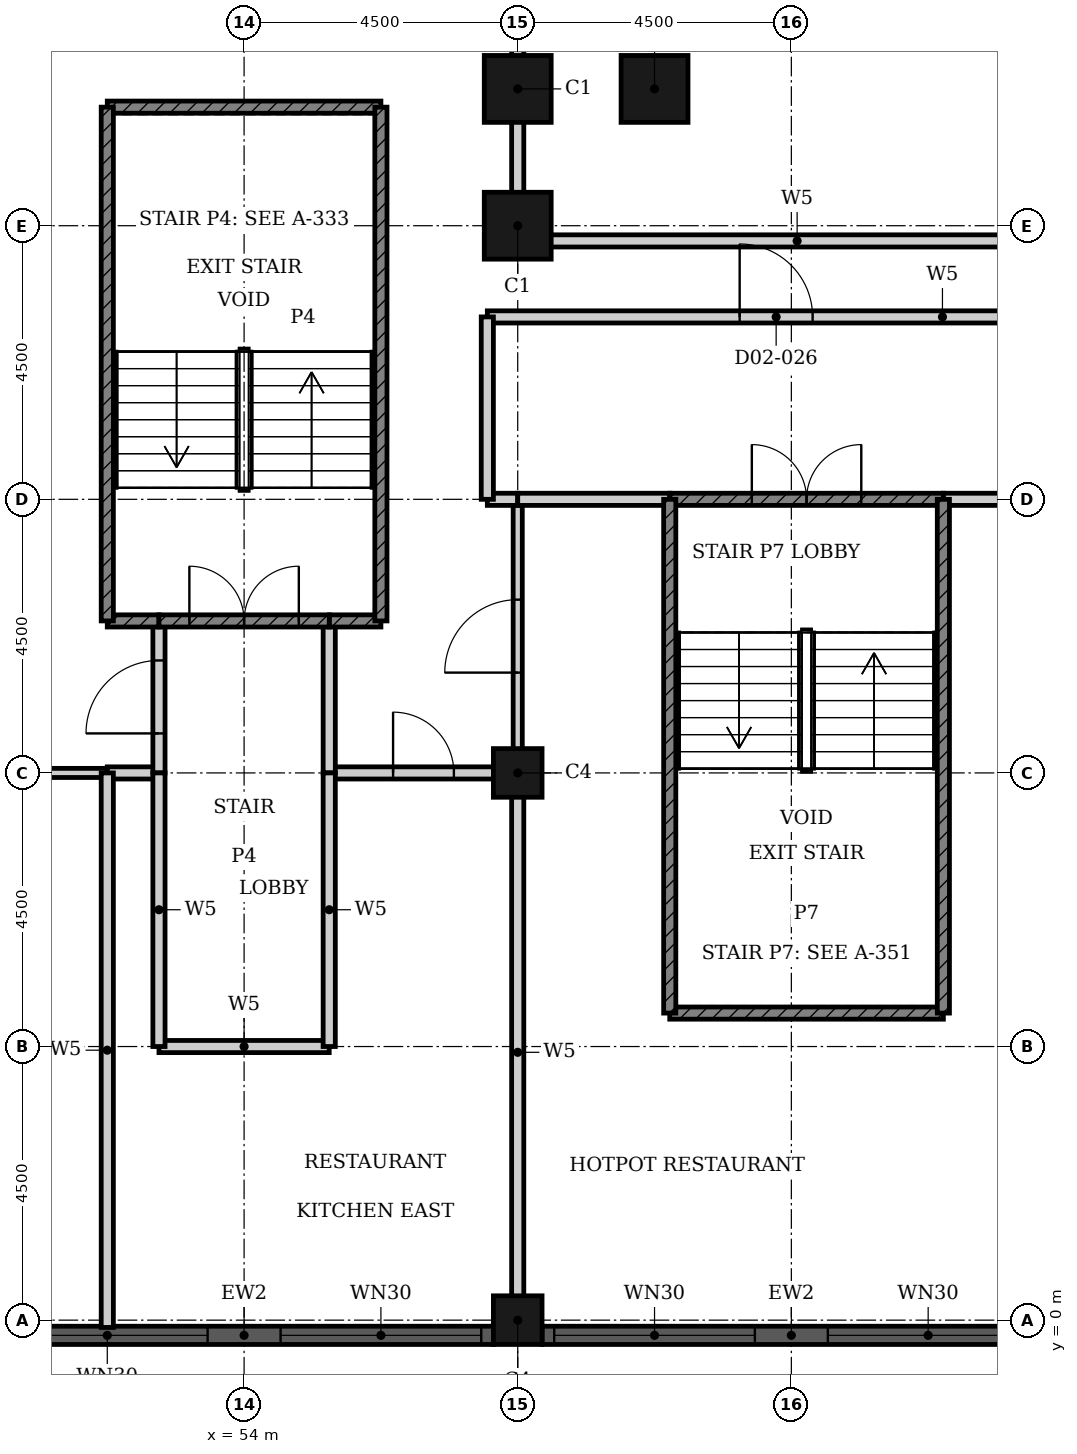
"""IFC4 building model, lengths in metres.
Left out: names, types, materials, properties, quantities, classifications, styles, units other than length and angle.
Written with IfcOpenShell. Run it as: python <this file> out.ifc"""

import sys

from ifc_helpers import new_model, si_unit, direction, frame, frame_2d, origin, origin_2d, place, context, subcontext, project, spatial, rectangle, hollow_rectangle, extrude, element, fill, save


model = new_model("IFC4")
c1 = context("Model", 3, precision=1e-05, world=origin(), true_north=direction((0.0, 1.0)))
c2 = subcontext(c1, "Body", "Model", "MODEL_VIEW")
j1 = project(units=[si_unit("LENGTHUNIT", "METRE"), si_unit("PLANEANGLEUNIT", "RADIAN")], contexts=[c1])
p1 = place(None, origin())
s1 = spatial("IfcSite", under=j1, at=p1, CompositionType="ELEMENT")
p2 = place(p1, origin())
s2 = spatial("IfcBuilding", under=s1, at=p2, CompositionType="ELEMENT")
p3 = place(p2, frame((0.0, 0.0, 12.0)))
s3 = spatial("IfcBuildingStorey", under=s2, at=p3, CompositionType="ELEMENT", Elevation=12.0)
for number, where, z_axis, x_axis in (
    (1, (58.5, 18.0, 0.0), (0.0, 0.0, 1.0), (1.0, 0.0, 0.0)),
    (2, (58.5, 20.25, 0.0), (0.0, 0.0, 1.0), (1.0, 0.0, 0.0)),
    (3, (60.75, 20.25, 0.0), (0.0, 0.0, 1.0), (1.0, 0.0, 0.0)),
):
    element("IfcColumn", number, at=place(p3, frame(where, z_axis=z_axis, x_axis=x_axis)), inside=s3, PredefinedType="COLUMN", context=c2, shape_type="SweptSolid", body=[
        extrude(hollow_rectangle(XDim=1.1, YDim=1.1, WallThickness=0.036, at=origin_2d()), origin(), (0.0, 0.0, 1.0), 5.4),
    ])
for number, where, z_axis, x_axis in (
    (4, (58.5, 0.0, 0.0), (0.0, 0.0, 1.0), (1.0, 0.0, 0.0)),
    (5, (58.5, 9.0, 0.0), (0.0, 0.0, 1.0), (1.0, 0.0, 0.0)),
):
    element("IfcColumn", number, at=place(p3, frame(where, z_axis=z_axis, x_axis=x_axis)), inside=s3, PredefinedType="COLUMN", context=c2, shape_type="SweptSolid", body=[
        extrude(hollow_rectangle(XDim=0.8, YDim=0.8, WallThickness=0.025, at=origin_2d()), origin(), (0.0, 0.0, 1.0), 5.4),
    ])
p4 = place(p3, frame((49.9, -0.25, 0.0), z_axis=(0.0, 0.0, 1.0), x_axis=(1.0, 0.0, 0.0)))
e6 = element("IfcWall", 6, at=p4, inside=s3, PredefinedType="SOLIDWALL", context=c2, shape_type="SweptSolid", body=[
    extrude(rectangle(XDim=8.2, YDim=0.3, at=frame_2d((4.1, 0.0))), origin(), (0.0, 0.0, 1.0), 5.4),
])
p5 = place(p4, frame((0.2, 0.0, 0.9)))
e7 = element("IfcOpeningElement", 7, at=p5, cuts=e6, PredefinedType="OPENING", context=c2, shape_type="SweptSolid", body=[
    extrude(rectangle(XDim=3.3, YDim=3.5, at=frame_2d((1.65, 1.75))), frame((0.0, 0.16, 0.0), z_axis=(0.0, -1.0, 0.0), x_axis=(1.0, 0.0, 0.0)), (0.0, 0.0, 1.0), 0.32),
])
p6 = place(p4, frame((4.7, 0.0, 0.9)))
e8 = element("IfcOpeningElement", 8, at=p6, cuts=e6, PredefinedType="OPENING", context=c2, shape_type="SweptSolid", body=[
    extrude(rectangle(XDim=3.3, YDim=3.5, at=frame_2d((1.65, 1.75))), frame((0.0, 0.16, 0.0), z_axis=(0.0, -1.0, 0.0), x_axis=(1.0, 0.0, 0.0)), (0.0, 0.0, 1.0), 0.32),
])
p7 = place(p3, frame((58.9, -0.25, 0.0), z_axis=(0.0, 0.0, 1.0), x_axis=(1.0, 0.0, 0.0)))
e9 = element("IfcWall", 9, at=p7, inside=s3, PredefinedType="SOLIDWALL", context=c2, shape_type="SweptSolid", body=[
    extrude(rectangle(XDim=8.2, YDim=0.3, at=frame_2d((4.1, 0.0))), origin(), (0.0, 0.0, 1.0), 5.4),
])
p8 = place(p7, frame((0.2, 0.0, 0.9)))
e10 = element("IfcOpeningElement", 10, at=p8, cuts=e9, PredefinedType="OPENING", context=c2, shape_type="SweptSolid", body=[
    extrude(rectangle(XDim=3.3, YDim=3.5, at=frame_2d((1.65, 1.75))), frame((0.0, 0.16, 0.0), z_axis=(0.0, -1.0, 0.0), x_axis=(1.0, 0.0, 0.0)), (0.0, 0.0, 1.0), 0.32),
])
p9 = place(p7, frame((4.7, 0.0, 0.9)))
e11 = element("IfcOpeningElement", 11, at=p9, cuts=e9, PredefinedType="OPENING", context=c2, shape_type="SweptSolid", body=[
    extrude(rectangle(XDim=3.3, YDim=3.5, at=frame_2d((1.65, 1.75))), frame((0.0, 0.16, 0.0), z_axis=(0.0, -1.0, 0.0), x_axis=(1.0, 0.0, 0.0)), (0.0, 0.0, 1.0), 0.32),
])
p10 = place(p3, frame((41.75, 9.0, 0.0), z_axis=(0.0, 0.0, 1.0), x_axis=(1.0, 0.0, 0.0)))
e12 = element("IfcWall", 12, at=p10, inside=s3, PredefinedType="PARTITIONING", context=c2, shape_type="SweptSolid", body=[
    extrude(rectangle(XDim=10.0, YDim=0.15, at=frame_2d((5.0, 0.0))), origin(), (0.0, 0.0, 1.0), 5.05),
])
p11 = place(p10, frame((4.4, 0.0, 0.0)))
e13 = element("IfcOpeningElement", 13, at=p11, cuts=e12, PredefinedType="OPENING", context=c2, shape_type="SweptSolid", body=[
    extrude(rectangle(XDim=1.2, YDim=2.4, at=frame_2d((0.6, 1.2))), frame((0.0, 0.085, 0.0), z_axis=(0.0, -1.0, 0.0), x_axis=(1.0, 0.0, 0.0)), (0.0, 0.0, 1.0), 0.17),
])
p12 = place(p3, frame((58.5, 9.0, 0.0), z_axis=(0.0, 0.0, 1.0), x_axis=(0.0, 1.0, 0.0)))
e14 = element("IfcWall", 14, at=p12, inside=s3, PredefinedType="PARTITIONING", context=c2, shape_type="SweptSolid", body=[
    extrude(rectangle(XDim=4.5, YDim=0.15, at=frame_2d((2.25, 0.0))), origin(), (0.0, 0.0, 1.0), 5.05),
])
p13 = place(p12, frame((1.65, 0.0, 0.0)))
e15 = element("IfcOpeningElement", 15, at=p13, cuts=e14, PredefinedType="OPENING", context=c2, shape_type="SweptSolid", body=[
    extrude(rectangle(XDim=1.2, YDim=2.4, at=frame_2d((0.6, 1.2))), frame((0.0, 0.085, 0.0), z_axis=(0.0, -1.0, 0.0), x_axis=(1.0, 0.0, 0.0)), (0.0, 0.0, 1.0), 0.17),
])
p14 = place(p3, frame((58.0, 13.5, 0.0), z_axis=(0.0, 0.0, 1.0), x_axis=(1.0, 0.0, 0.0)))
e16 = element("IfcWall", 16, at=p14, inside=s3, PredefinedType="PARTITIONING", context=c2, shape_type="SweptSolid", body=[
    extrude(rectangle(XDim=0.5, YDim=0.2, at=frame_2d((0.25, 0.0))), origin(), (0.0, 0.0, 1.0), 5.05),
])
p15 = place(p3, frame((58.5, 13.5, 0.0), z_axis=(0.0, 0.0, 1.0), x_axis=(1.0, 0.0, 0.0)))
e17 = element("IfcWall", 17, at=p15, inside=s3, PredefinedType="PARTITIONING", context=c2, shape_type="SweptSolid", body=[
    extrude(rectangle(XDim=2.5, YDim=0.2, at=frame_2d((1.25, 0.0))), origin(), (0.0, 0.0, 1.0), 5.05),
])
p16 = place(p3, frame((65.5, 13.5, 0.0), z_axis=(0.0, 0.0, 1.0), x_axis=(1.0, 0.0, 0.0)))
e18 = element("IfcWall", 18, at=p16, inside=s3, PredefinedType="PARTITIONING", context=c2, shape_type="SweptSolid", body=[
    extrude(rectangle(XDim=2.29, YDim=0.2, at=frame_2d((1.145, 0.0))), origin(), (0.0, 0.0, 1.0), 5.05),
])
p17 = place(p3, frame((58.0, 16.5, 0.0), z_axis=(0.0, 0.0, 1.0), x_axis=(1.0, 0.0, 0.0)))
e19 = element("IfcWall", 19, at=p17, inside=s3, PredefinedType="PARTITIONING", context=c2, shape_type="SweptSolid", body=[
    extrude(rectangle(XDim=9.62, YDim=0.2, at=frame_2d((4.81, 0.0))), origin(), (0.0, 0.0, 1.0), 5.05),
])
p18 = place(p17, frame((4.15, 0.0, 0.0)))
e20 = element("IfcOpeningElement", 20, at=p18, cuts=e19, PredefinedType="OPENING", context=c2, shape_type="SweptSolid", body=[
    extrude(rectangle(XDim=1.2, YDim=2.1, at=frame_2d((0.6, 1.05))), frame((0.0, 0.11, 0.0), z_axis=(0.0, -1.0, 0.0), x_axis=(1.0, 0.0, 0.0)), (0.0, 0.0, 1.0), 0.22),
])
p19 = place(p3, frame((58.5, 17.75, 0.0), z_axis=(0.0, 0.0, 1.0), x_axis=(1.0, 0.0, 0.0)))
e21 = element("IfcWall", 21, at=p19, inside=s3, PredefinedType="PARTITIONING", context=c2, shape_type="SweptSolid", body=[
    extrude(rectangle(XDim=9.19, YDim=0.2, at=frame_2d((4.595, 0.0))), origin(), (0.0, 0.0, 1.0), 5.05),
])
p20 = place(p3, frame((52.6, 4.5, 0.0), z_axis=(0.0, 0.0, 1.0), x_axis=(1.0, 0.0, 0.0)))
e22 = element("IfcWall", 22, at=p20, inside=s3, PredefinedType="PARTITIONING", context=c2, shape_type="SweptSolid", body=[
    extrude(rectangle(XDim=2.8, YDim=0.2, at=frame_2d((1.4, 0.0))), origin(), (0.0, 0.0, 1.0), 5.05),
])
p21 = place(p3, frame((51.75, 9.0, 0.0), z_axis=(0.0, 0.0, 1.0), x_axis=(1.0, 0.0, 0.0)))
e23 = element("IfcWall", 23, at=p21, inside=s3, PredefinedType="PARTITIONING", context=c2, shape_type="SweptSolid", body=[
    extrude(rectangle(XDim=0.85, YDim=0.2, at=frame_2d((0.425, 0.0))), origin(), (0.0, 0.0, 1.0), 5.05),
])
p22 = place(p3, frame((55.4, 9.0, 0.0), z_axis=(0.0, 0.0, 1.0), x_axis=(1.0, 0.0, 0.0)))
e24 = element("IfcWall", 24, at=p22, inside=s3, PredefinedType="PARTITIONING", context=c2, shape_type="SweptSolid", body=[
    extrude(rectangle(XDim=3.1, YDim=0.2, at=frame_2d((1.55, 0.0))), origin(), (0.0, 0.0, 1.0), 5.05),
])
p23 = place(p22, frame((1.05, 0.0, 0.0)))
e25 = element("IfcOpeningElement", 25, at=p23, cuts=e24, PredefinedType="OPENING", context=c2, shape_type="SweptSolid", body=[
    extrude(rectangle(XDim=1.0, YDim=2.1, at=frame_2d((0.5, 1.05))), frame((0.0, 0.11, 0.0), z_axis=(0.0, -1.0, 0.0), x_axis=(1.0, 0.0, 0.0)), (0.0, 0.0, 1.0), 0.22),
])
p24 = place(p3, frame((51.75, -0.12, 0.0), z_axis=(0.0, 0.0, 1.0), x_axis=(0.0, 1.0, 0.0)))
e26 = element("IfcWall", 26, at=p24, inside=s3, PredefinedType="PARTITIONING", context=c2, shape_type="SweptSolid", body=[
    extrude(rectangle(XDim=9.12, YDim=0.2, at=frame_2d((4.56, 0.0))), origin(), (0.0, 0.0, 1.0), 5.05),
])
p25 = place(p3, frame((52.6, 9.0, 0.0), z_axis=(0.0, 0.0, 1.0), x_axis=(0.0, 1.0, 0.0)))
e27 = element("IfcWall", 27, at=p25, inside=s3, PredefinedType="PARTITIONING", context=c2, shape_type="SweptSolid", body=[
    extrude(rectangle(XDim=2.5, YDim=0.2, at=frame_2d((1.25, 0.0))), origin(), (0.0, 0.0, 1.0), 5.05),
])
p26 = place(p25, frame((0.65, 0.0, 0.0)))
e28 = element("IfcOpeningElement", 28, at=p26, cuts=e27, PredefinedType="OPENING", context=c2, shape_type="SweptSolid", body=[
    extrude(rectangle(XDim=1.2, YDim=2.1, at=frame_2d((0.6, 1.05))), frame((0.0, 0.11, 0.0), z_axis=(0.0, -1.0, 0.0), x_axis=(1.0, 0.0, 0.0)), (0.0, 0.0, 1.0), 0.22),
])
p27 = place(p3, frame((52.6, 4.5, 0.0), z_axis=(0.0, 0.0, 1.0), x_axis=(0.0, 1.0, 0.0)))
e29 = element("IfcWall", 29, at=p27, inside=s3, PredefinedType="PARTITIONING", context=c2, shape_type="SweptSolid", body=[
    extrude(rectangle(XDim=4.5, YDim=0.2, at=frame_2d((2.25, 0.0))), origin(), (0.0, 0.0, 1.0), 5.05),
])
p28 = place(p3, frame((55.4, 9.0, 0.0), z_axis=(0.0, 0.0, 1.0), x_axis=(0.0, 1.0, 0.0)))
e30 = element("IfcWall", 30, at=p28, inside=s3, PredefinedType="PARTITIONING", context=c2, shape_type="SweptSolid", body=[
    extrude(rectangle(XDim=2.5, YDim=0.2, at=frame_2d((1.25, 0.0))), origin(), (0.0, 0.0, 1.0), 5.05),
])
p29 = place(p3, frame((55.4, 4.5, 0.0), z_axis=(0.0, 0.0, 1.0), x_axis=(0.0, 1.0, 0.0)))
e31 = element("IfcWall", 31, at=p29, inside=s3, PredefinedType="PARTITIONING", context=c2, shape_type="SweptSolid", body=[
    extrude(rectangle(XDim=4.5, YDim=0.2, at=frame_2d((2.25, 0.0))), origin(), (0.0, 0.0, 1.0), 5.05),
])
p30 = place(p3, frame((58.0, 13.5, 0.0), z_axis=(0.0, 0.0, 1.0), x_axis=(0.0, 1.0, 0.0)))
e32 = element("IfcWall", 32, at=p30, inside=s3, PredefinedType="PARTITIONING", context=c2, shape_type="SweptSolid", body=[
    extrude(rectangle(XDim=3.0, YDim=0.2, at=frame_2d((1.5, 0.0))), origin(), (0.0, 0.0, 1.0), 5.05),
])
p31 = place(p3, frame((58.5, -0.19, 0.0), z_axis=(0.0, 0.0, 1.0), x_axis=(0.0, 1.0, 0.0)))
e33 = element("IfcWall", 33, at=p31, inside=s3, PredefinedType="PARTITIONING", context=c2, shape_type="SweptSolid", body=[
    extrude(rectangle(XDim=9.19, YDim=0.2, at=frame_2d((4.595, 0.0))), origin(), (0.0, 0.0, 1.0), 5.05),
])
p32 = place(p3, frame((58.5, 17.75, 0.0), z_axis=(0.0, 0.0, 1.0), x_axis=(0.0, 1.0, 0.0)))
e34 = element("IfcWall", 34, at=p32, inside=s3, PredefinedType="PARTITIONING", context=c2, shape_type="SweptSolid", body=[
    extrude(rectangle(XDim=11.75, YDim=0.2, at=frame_2d((5.875, 0.0))), origin(), (0.0, 0.0, 1.0), 5.05),
])
p33 = place(p32, frame((5.375, 0.0, 0.0)))
e35 = element("IfcOpeningElement", 35, at=p33, cuts=e34, PredefinedType="OPENING", context=c2, shape_type="SweptSolid", body=[
    extrude(rectangle(XDim=1.0, YDim=2.1, at=frame_2d((0.5, 1.05))), frame((0.0, 0.11, 0.0), z_axis=(0.0, -1.0, 0.0), x_axis=(1.0, 0.0, 0.0)), (0.0, 0.0, 1.0), 0.22),
])
for number, where, z_axis, x_axis in (
    (36, (51.75, 11.5, 0.0), (0.0, 0.0, 1.0), (1.0, 0.0, 0.0)),
    (37, (55.4, 11.5, 0.0), (0.0, 0.0, 1.0), (1.0, 0.0, 0.0)),
):
    element("IfcWall", number, at=place(p3, frame(where, z_axis=z_axis, x_axis=x_axis)), inside=s3, PredefinedType="SHEAR", context=c2, shape_type="SweptSolid", body=[
        extrude(rectangle(XDim=0.85, YDim=0.2, at=frame_2d((0.425, 0.0))), origin(), (0.0, 0.0, 1.0), 5.05),
    ])
p34 = place(p3, frame((52.6, 11.5, 0.0), z_axis=(0.0, 0.0, 1.0), x_axis=(1.0, 0.0, 0.0)))
e38 = element("IfcWall", 38, at=p34, inside=s3, PredefinedType="SHEAR", context=c2, shape_type="SweptSolid", body=[
    extrude(rectangle(XDim=2.8, YDim=0.2, at=frame_2d((1.4, 0.0))), origin(), (0.0, 0.0, 1.0), 5.05),
])
p35 = place(p34, frame((0.5, 0.0, 0.0)))
e39 = element("IfcOpeningElement", 39, at=p35, cuts=e38, PredefinedType="OPENING", context=c2, shape_type="SweptSolid", body=[
    extrude(rectangle(XDim=1.8, YDim=2.1, at=frame_2d((0.9, 1.05))), frame((0.0, 0.11, 0.0), z_axis=(0.0, -1.0, 0.0), x_axis=(1.0, 0.0, 0.0)), (0.0, 0.0, 1.0), 0.22),
])
p36 = place(p3, frame((61.0, 13.5, 0.0), z_axis=(0.0, 0.0, 1.0), x_axis=(1.0, 0.0, 0.0)))
e40 = element("IfcWall", 40, at=p36, inside=s3, PredefinedType="SHEAR", context=c2, shape_type="SweptSolid", body=[
    extrude(rectangle(XDim=4.5, YDim=0.2, at=frame_2d((2.25, 0.0))), origin(), (0.0, 0.0, 1.0), 5.05),
])
p37 = place(p36, frame((1.35, 0.0, 0.0)))
e41 = element("IfcOpeningElement", 41, at=p37, cuts=e40, PredefinedType="OPENING", context=c2, shape_type="SweptSolid", body=[
    extrude(rectangle(XDim=1.8, YDim=2.1, at=frame_2d((0.9, 1.05))), frame((0.0, 0.11, 0.0), z_axis=(0.0, -1.0, 0.0), x_axis=(1.0, 0.0, 0.0)), (0.0, 0.0, 1.0), 0.22),
])
for number, where, z_axis, x_axis in (
    (42, (51.75, 19.95, 0.0), (0.0, 0.0, 1.0), (1.0, 0.0, 0.0)),
    (43, (61.0, 5.05, 0.0), (0.0, 0.0, 1.0), (1.0, 0.0, 0.0)),
):
    element("IfcWall", number, at=place(p3, frame(where, z_axis=z_axis, x_axis=x_axis)), inside=s3, PredefinedType="SHEAR", context=c2, shape_type="SweptSolid", body=[
        extrude(rectangle(XDim=4.5, YDim=0.2, at=frame_2d((2.25, 0.0))), origin(), (0.0, 0.0, 1.0), 5.05),
    ])
for number, where, z_axis, x_axis in (
    (44, (51.75, 11.5, 0.0), (0.0, 0.0, 1.0), (0.0, 1.0, 0.0)),
    (45, (56.25, 11.5, 0.0), (0.0, 0.0, 1.0), (0.0, 1.0, 0.0)),
    (46, (61.0, 5.05, 0.0), (0.0, 0.0, 1.0), (0.0, 1.0, 0.0)),
    (47, (65.5, 5.05, 0.0), (0.0, 0.0, 1.0), (0.0, 1.0, 0.0)),
):
    element("IfcWall", number, at=place(p3, frame(where, z_axis=z_axis, x_axis=x_axis)), inside=s3, PredefinedType="SHEAR", context=c2, shape_type="SweptSolid", body=[
        extrude(rectangle(XDim=8.45, YDim=0.2, at=frame_2d((4.225, 0.0))), origin(), (0.0, 0.0, 1.0), 5.05),
    ])
p38 = place(p5, origin())
e48 = element("IfcWindow", 48, at=p38, inside=s3, PartitioningType="SINGLE_PANEL", PredefinedType="WINDOW", context=c2, shape_type="SweptSolid", body=[
    extrude(rectangle(XDim=3.3, YDim=3.5, at=frame_2d((1.65, 1.75))), frame((0.0, 0.03, 0.0), z_axis=(0.0, -1.0, 0.0), x_axis=(1.0, 0.0, 0.0)), (0.0, 0.0, 1.0), 0.06),
])
fill(e7, e48)
p39 = place(p6, origin())
e49 = element("IfcWindow", 49, at=p39, inside=s3, PartitioningType="SINGLE_PANEL", PredefinedType="WINDOW", context=c2, shape_type="SweptSolid", body=[
    extrude(rectangle(XDim=3.3, YDim=3.5, at=frame_2d((1.65, 1.75))), frame((0.0, 0.03, 0.0), z_axis=(0.0, -1.0, 0.0), x_axis=(1.0, 0.0, 0.0)), (0.0, 0.0, 1.0), 0.06),
])
fill(e8, e49)
p40 = place(p8, origin())
e50 = element("IfcWindow", 50, at=p40, inside=s3, PartitioningType="SINGLE_PANEL", PredefinedType="WINDOW", context=c2, shape_type="SweptSolid", body=[
    extrude(rectangle(XDim=3.3, YDim=3.5, at=frame_2d((1.65, 1.75))), frame((0.0, 0.03, 0.0), z_axis=(0.0, -1.0, 0.0), x_axis=(1.0, 0.0, 0.0)), (0.0, 0.0, 1.0), 0.06),
])
fill(e10, e50)
p41 = place(p9, origin())
e51 = element("IfcWindow", 51, at=p41, inside=s3, PartitioningType="SINGLE_PANEL", PredefinedType="WINDOW", context=c2, shape_type="SweptSolid", body=[
    extrude(rectangle(XDim=3.3, YDim=3.5, at=frame_2d((1.65, 1.75))), frame((0.0, 0.03, 0.0), z_axis=(0.0, -1.0, 0.0), x_axis=(1.0, 0.0, 0.0)), (0.0, 0.0, 1.0), 0.06),
])
fill(e11, e51)
p42 = place(p26, origin())
e52 = element("IfcDoor", 52, at=p42, inside=s3, OperationType="SINGLE_SWING_LEFT", PredefinedType="DOOR", context=c2, shape_type="SweptSolid", body=[
    extrude(rectangle(XDim=1.2, YDim=2.1, at=frame_2d((0.6, 1.05))), frame((0.0, 0.025, 0.0), z_axis=(0.0, -1.0, 0.0), x_axis=(1.0, 0.0, 0.0)), (0.0, 0.0, 1.0), 0.05),
])
fill(e28, e52)
p43 = place(p35, origin())
e53 = element("IfcDoor", 53, at=p43, inside=s3, OperationType="DOUBLE_DOOR_SINGLE_SWING", PredefinedType="DOOR", context=c2, shape_type="SweptSolid", body=[
    extrude(rectangle(XDim=1.8, YDim=2.1, at=frame_2d((0.9, 1.05))), frame((0.0, 0.025, 0.0), z_axis=(0.0, -1.0, 0.0), x_axis=(1.0, 0.0, 0.0)), (0.0, 0.0, 1.0), 0.05),
])
fill(e39, e53)
p44 = place(p18, origin())
e54 = element("IfcDoor", 54, at=p44, inside=s3, OperationType="SINGLE_SWING_LEFT", PredefinedType="DOOR", context=c2, shape_type="SweptSolid", body=[
    extrude(rectangle(XDim=1.2, YDim=2.1, at=frame_2d((0.6, 1.05))), frame((0.0, 0.025, 0.0), z_axis=(0.0, -1.0, 0.0), x_axis=(1.0, 0.0, 0.0)), (0.0, 0.0, 1.0), 0.05),
])
fill(e20, e54)
p45 = place(p37, origin())
e55 = element("IfcDoor", 55, at=p45, inside=s3, OperationType="DOUBLE_DOOR_SINGLE_SWING", PredefinedType="DOOR", context=c2, shape_type="SweptSolid", body=[
    extrude(rectangle(XDim=1.8, YDim=2.1, at=frame_2d((0.9, 1.05))), frame((0.0, 0.025, 0.0), z_axis=(0.0, -1.0, 0.0), x_axis=(1.0, 0.0, 0.0)), (0.0, 0.0, 1.0), 0.05),
])
fill(e41, e55)
p46 = place(p13, origin())
e56 = element("IfcDoor", 56, at=p46, inside=s3, OperationType="SINGLE_SWING_RIGHT", PredefinedType="DOOR", context=c2, shape_type="SweptSolid", body=[
    extrude(rectangle(XDim=1.2, YDim=2.4, at=frame_2d((0.6, 1.2))), frame((0.0, 0.025, 0.0), z_axis=(0.0, -1.0, 0.0), x_axis=(1.0, 0.0, 0.0)), (0.0, 0.0, 1.0), 0.05),
])
fill(e15, e56)
p47 = place(p23, origin())
e57 = element("IfcDoor", 57, at=p47, inside=s3, OperationType="SINGLE_SWING_RIGHT", PredefinedType="DOOR", context=c2, shape_type="SweptSolid", body=[
    extrude(rectangle(XDim=1.0, YDim=2.1, at=frame_2d((0.5, 1.05))), frame((0.0, 0.025, 0.0), z_axis=(0.0, -1.0, 0.0), x_axis=(1.0, 0.0, 0.0)), (0.0, 0.0, 1.0), 0.05),
])
fill(e25, e57)
save(model, sys.argv[1])
